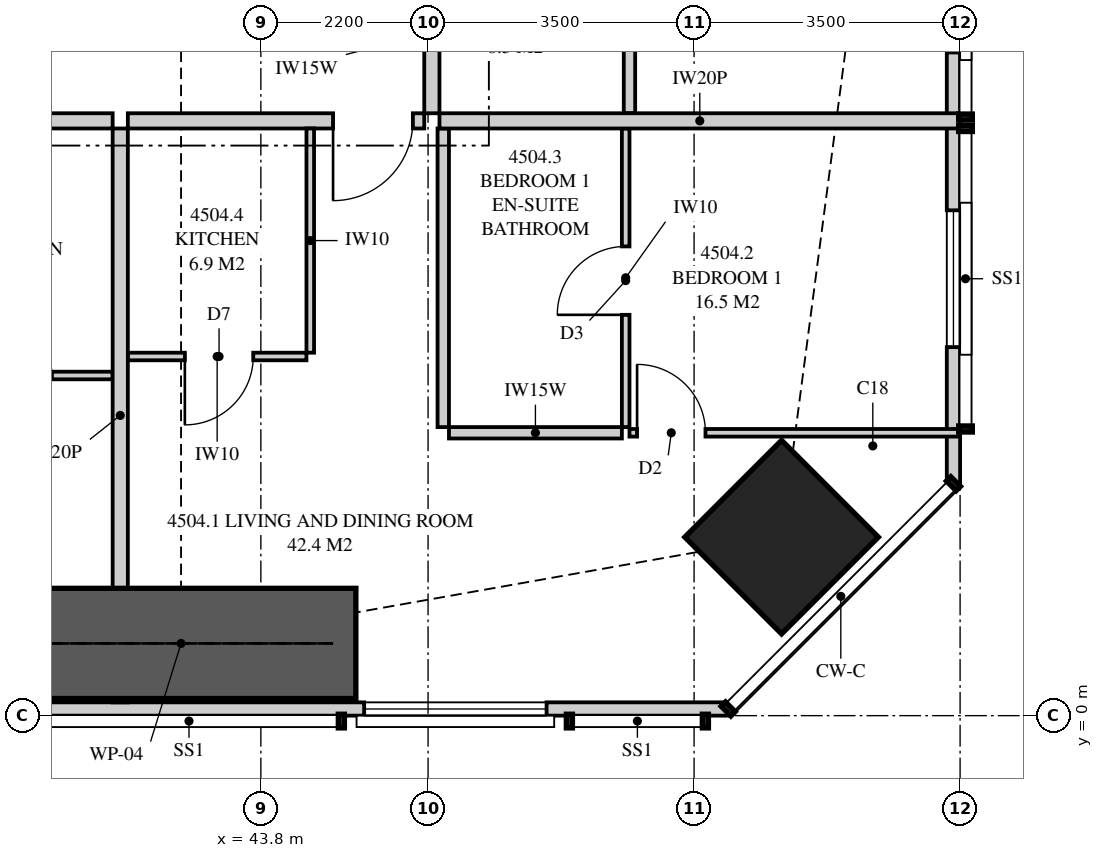
"""IFC4 building model, lengths in metres.
Left out: names, types, materials, properties, quantities, classifications, styles, units other than length and angle.
Written with IfcOpenShell. Run it as: python <this file> out.ifc"""

import sys

from ifc_helpers import new_model, si_unit, direction, frame, frame_2d, origin, origin_2d, place, context, subcontext, project, spatial, polyline, rectangle, outline, extrude, element, fill, save


model = new_model("IFC4")
c1 = context("Model", 3, precision=1e-05, world=origin(), true_north=direction((0.0, 1.0)))
c2 = subcontext(c1, "Body", "Model", "MODEL_VIEW")
j1 = project(units=[si_unit("LENGTHUNIT", "METRE"), si_unit("PLANEANGLEUNIT", "RADIAN")], contexts=[c1])
p1 = place(None, origin())
s1 = spatial("IfcSite", under=j1, at=p1, CompositionType="ELEMENT")
p2 = place(p1, origin())
s2 = spatial("IfcBuilding", under=s1, at=p2, CompositionType="ELEMENT")
p3 = place(p2, frame((0.0, 0.0, 167.75)))
s3 = spatial("IfcBuildingStorey", under=s2, at=p3, CompositionType="ELEMENT", Elevation=167.75)
p4 = place(p3, frame((50.652, 2.348, 0.0), z_axis=(0.0, 0.0, 1.0), x_axis=(0.707106781187, 0.707106781187, 0.0)))
e1 = element("IfcColumn", 1, at=p4, inside=s3, PredefinedType="COLUMN", context=c2, shape_type="SweptSolid", body=[
    extrude(rectangle(XDim=1.8, YDim=1.8, at=origin_2d()), origin(), (0.0, 0.0, 1.0), 3.35),
])
p5 = place(p3, frame((15.051, 0.087, 0.0), z_axis=(0.0, 0.0, 1.0), x_axis=(1.0, 0.0, 0.0)))
e2 = element("IfcWall", 2, at=p5, inside=s3, PredefinedType="SOLIDWALL", context=c2, shape_type="SweptSolid", body=[
    extrude(outline(polyline([(0.0, 0.0), (34.897, 0.0), (34.897, 3.11), (27.91, 3.11), (27.91, 2.15), (27.836, 2.15), (27.836, 3.11), (27.699, 3.11), (27.699, 2.15), (7.199, 2.15), (7.199, 3.11), (7.062, 3.11), (7.062, 2.15), (6.987, 2.15), (6.987, 3.11), (0.0, 3.11), (0.0, 0.0)])), frame((0.0, 0.087, 0.0), z_axis=(0.0, -1.0, 0.0), x_axis=(1.0, 0.0, 0.0)), (0.0, 0.0, 1.0), 0.175),
])
p6 = place(p5, frame((1.824, 0.0, 0.4)))
e3 = element("IfcOpeningElement", 3, at=p6, cuts=e2, PredefinedType="OPENING", context=c2, shape_type="SweptSolid", body=[
    extrude(rectangle(XDim=2.4, YDim=1.7, at=frame_2d((1.2, 0.85))), frame((0.0, 0.097, 0.0), z_axis=(0.0, -1.0, 0.0), x_axis=(1.0, 0.0, 0.0)), (0.0, 0.0, 1.0), 0.195),
])
p7 = place(p5, frame((10.399, 0.0, 0.0)))
e4 = element("IfcOpeningElement", 4, at=p7, cuts=e2, PredefinedType="OPENING", context=c2, shape_type="SweptSolid", body=[
    extrude(rectangle(XDim=1.8, YDim=2.1, at=frame_2d((0.9, 1.05))), frame((0.0, 0.097, 0.0), z_axis=(0.0, -1.0, 0.0), x_axis=(1.0, 0.0, 0.0)), (0.0, 0.0, 1.0), 0.195),
])
p8 = place(p5, frame((13.827, 0.0, 0.4)))
e5 = element("IfcOpeningElement", 5, at=p8, cuts=e2, PredefinedType="OPENING", context=c2, shape_type="SweptSolid", body=[
    extrude(rectangle(XDim=1.2, YDim=1.7, at=frame_2d((0.6, 0.85))), frame((0.0, 0.097, 0.0), z_axis=(0.0, -1.0, 0.0), x_axis=(1.0, 0.0, 0.0)), (0.0, 0.0, 1.0), 0.195),
])
p9 = place(p5, frame((22.799, 0.0, 0.0)))
e6 = element("IfcOpeningElement", 6, at=p9, cuts=e2, PredefinedType="OPENING", context=c2, shape_type="SweptSolid", body=[
    extrude(rectangle(XDim=1.8, YDim=2.1, at=frame_2d((0.9, 1.05))), frame((0.0, 0.097, 0.0), z_axis=(0.0, -1.0, 0.0), x_axis=(1.0, 0.0, 0.0)), (0.0, 0.0, 1.0), 0.195),
])
p10 = place(p5, frame((19.849, 0.0, 0.4)))
e7 = element("IfcOpeningElement", 7, at=p10, cuts=e2, PredefinedType="OPENING", context=c2, shape_type="SweptSolid", body=[
    extrude(rectangle(XDim=2.4, YDim=1.7, at=frame_2d((1.2, 0.85))), frame((0.0, 0.097, 0.0), z_axis=(0.0, -1.0, 0.0), x_axis=(1.0, 0.0, 0.0)), (0.0, 0.0, 1.0), 0.195),
])
p11 = place(p5, frame((30.108, 0.0, 0.4)))
e8 = element("IfcOpeningElement", 8, at=p11, cuts=e2, PredefinedType="OPENING", context=c2, shape_type="SweptSolid", body=[
    extrude(rectangle(XDim=2.4, YDim=1.7, at=frame_2d((1.2, 0.85))), frame((0.0, 0.097, 0.0), z_axis=(0.0, -1.0, 0.0), x_axis=(1.0, 0.0, 0.0)), (0.0, 0.0, 1.0), 0.195),
])
p12 = place(p3, frame((52.913, 3.051, 0.0), z_axis=(0.0, 0.0, 1.0), x_axis=(0.0, 1.0, 0.0)))
e9 = element("IfcWall", 9, at=p12, inside=s3, PredefinedType="SOLIDWALL", context=c2, shape_type="SweptSolid", body=[
    extrude(outline(polyline([(0.0, 0.0), (29.897, 0.0), (29.897, 3.11), (22.167, 3.11), (22.167, 2.15), (22.074, 2.15), (22.074, 3.11), (21.949, 3.11), (21.949, 2.15), (9.949, 2.15), (9.949, 3.11), (9.847, 3.11), (9.847, 2.15), (9.706, 2.15), (9.706, 3.11), (0.0, 3.11), (0.0, 0.0)])), frame((0.0, 0.087, 0.0), z_axis=(0.0, -1.0, 0.0), x_axis=(1.0, 0.0, 0.0)), (0.0, 0.0, 1.0), 0.175),
])
p13 = place(p12, frame((1.797, 0.0, 0.4)))
e10 = element("IfcOpeningElement", 10, at=p13, cuts=e9, PredefinedType="OPENING", context=c2, shape_type="SweptSolid", body=[
    extrude(rectangle(XDim=1.8, YDim=1.7, at=frame_2d((0.9, 0.85))), frame((0.0, 0.097, 0.0), z_axis=(0.0, -1.0, 0.0), x_axis=(1.0, 0.0, 0.0)), (0.0, 0.0, 1.0), 0.195),
])
p14 = place(p12, frame((5.674, 0.0, 0.4)))
e11 = element("IfcOpeningElement", 11, at=p14, cuts=e9, PredefinedType="OPENING", context=c2, shape_type="SweptSolid", body=[
    extrude(rectangle(XDim=1.8, YDim=1.7, at=frame_2d((0.9, 0.85))), frame((0.0, 0.097, 0.0), z_axis=(0.0, -1.0, 0.0), x_axis=(1.0, 0.0, 0.0)), (0.0, 0.0, 1.0), 0.195),
])
p15 = place(p12, frame((12.349, 0.0, 0.4)))
e12 = element("IfcOpeningElement", 12, at=p15, cuts=e9, PredefinedType="OPENING", context=c2, shape_type="SweptSolid", body=[
    extrude(rectangle(XDim=2.4, YDim=1.7, at=frame_2d((1.2, 0.85))), frame((0.0, 0.097, 0.0), z_axis=(0.0, -1.0, 0.0), x_axis=(1.0, 0.0, 0.0)), (0.0, 0.0, 1.0), 0.195),
])
p16 = place(p12, frame((15.274, 0.0, 0.0)))
e13 = element("IfcOpeningElement", 13, at=p16, cuts=e9, PredefinedType="OPENING", context=c2, shape_type="SweptSolid", body=[
    extrude(rectangle(XDim=1.8, YDim=2.1, at=frame_2d((0.9, 1.05))), frame((0.0, 0.097, 0.0), z_axis=(0.0, -1.0, 0.0), x_axis=(1.0, 0.0, 0.0)), (0.0, 0.0, 1.0), 0.195),
])
p17 = place(p12, frame((24.373, 0.0, 0.4)))
e14 = element("IfcOpeningElement", 14, at=p17, cuts=e9, PredefinedType="OPENING", context=c2, shape_type="SweptSolid", body=[
    extrude(rectangle(XDim=1.2, YDim=1.7, at=frame_2d((0.6, 0.85))), frame((0.0, 0.097, 0.0), z_axis=(0.0, -1.0, 0.0), x_axis=(1.0, 0.0, 0.0)), (0.0, 0.0, 1.0), 0.195),
])
p18 = place(p12, frame((26.801, 0.0, 0.4)))
e15 = element("IfcOpeningElement", 15, at=p18, cuts=e9, PredefinedType="OPENING", context=c2, shape_type="SweptSolid", body=[
    extrude(rectangle(XDim=1.8, YDim=1.7, at=frame_2d((0.9, 0.85))), frame((0.0, 0.097, 0.0), z_axis=(0.0, -1.0, 0.0), x_axis=(1.0, 0.0, 0.0)), (0.0, 0.0, 1.0), 0.195),
])
p19 = place(p3, frame((41.95, 0.175, 0.0), z_axis=(0.0, 0.0, 1.0), x_axis=(0.0, 1.0, 0.0)))
e16 = element("IfcWall", 16, at=p19, inside=s3, PredefinedType="PARTITIONING", context=c2, shape_type="SweptSolid", body=[
    extrude(outline(polyline([(0.529, 2.15), (0.0, 2.15), (0.0, 0.0), (0.529, 0.0), (0.529, 0.876), (1.021, 0.876), (1.021, 0.0), (7.55, 0.0), (7.55, 3.11), (1.685, 3.11), (1.685, 2.15), (1.021, 2.15), (1.021, 1.274), (0.529, 1.274), (0.529, 2.15)])), frame((0.0, 0.1, 0.0), z_axis=(0.0, -1.0, 0.0), x_axis=(1.0, 0.0, 0.0)), (0.0, 0.0, 1.0), 0.2),
])
p20 = place(p3, frame((42.05, 7.825, 0.0), z_axis=(0.0, 0.0, 1.0), x_axis=(1.0, 0.0, 0.0)))
e17 = element("IfcWall", 17, at=p20, inside=s3, PredefinedType="PARTITIONING", context=c2, shape_type="SweptSolid", body=[
    extrude(outline(polyline([(0.0, 0.0), (3.9, 0.0), (3.9, 3.11), (1.037, 3.11), (1.037, 2.541), (0.363, 2.541), (0.363, 3.11), (0.0, 3.11), (0.0, 0.0)])), frame((0.0, 0.1, 0.0), z_axis=(0.0, -1.0, 0.0), x_axis=(1.0, 0.0, 0.0)), (0.0, 0.0, 1.0), 0.2),
])
p21 = place(p20, frame((2.7, 0.0, 0.0)))
e18 = element("IfcOpeningElement", 18, at=p21, cuts=e17, PredefinedType="OPENING", context=c2, shape_type="SweptSolid", body=[
    extrude(rectangle(XDim=1.05, YDim=2.2, at=frame_2d((0.525, 1.1))), frame((0.0, 0.11, 0.0), z_axis=(0.0, -1.0, 0.0), x_axis=(1.0, 0.0, 0.0)), (0.0, 0.0, 1.0), 0.22),
])
p22 = place(p3, frame((48.6, 3.796, 0.0), z_axis=(0.0, 0.0, 1.0), x_axis=(0.0, 1.0, 0.0)))
e19 = element("IfcWall", 19, at=p22, inside=s3, PredefinedType="PARTITIONING", context=c2, shape_type="SweptSolid", body=[
    extrude(rectangle(XDim=3.929, YDim=0.1, at=frame_2d((1.964, 0.0))), origin(), (0.0, 0.0, 1.0), 3.11),
])
p23 = place(p22, frame((1.477, 0.0, 0.0)))
e20 = element("IfcOpeningElement", 20, at=p23, cuts=e19, PredefinedType="OPENING", context=c2, shape_type="SweptSolid", body=[
    extrude(rectangle(XDim=0.9, YDim=2.1, at=frame_2d((0.45, 1.05))), frame((0.0, 0.06, 0.0), z_axis=(0.0, -1.0, 0.0), x_axis=(1.0, 0.0, 0.0)), (0.0, 0.0, 1.0), 0.12),
])
p24 = place(p3, frame((48.65, 3.721, 0.0), z_axis=(0.0, 0.0, 1.0), x_axis=(1.0, 0.0, 0.0)))
e21 = element("IfcWall", 21, at=p24, inside=s3, PredefinedType="PARTITIONING", context=c2, shape_type="SweptSolid", body=[
    extrude(outline(polyline([(0.0, 0.0), (4.35, 0.0), (4.35, 3.11), (3.049, 3.11), (3.049, 2.15), (1.314, 2.15), (1.314, 3.11), (0.0, 3.11), (0.0, 0.0)])), frame((0.0, 0.05, 0.0), z_axis=(0.0, -1.0, 0.0), x_axis=(1.0, 0.0, 0.0)), (0.0, 0.0, 1.0), 0.1),
])
p25 = place(p24, frame((0.1, 0.0, 0.0)))
e22 = element("IfcOpeningElement", 22, at=p25, cuts=e21, PredefinedType="OPENING", context=c2, shape_type="SweptSolid", body=[
    extrude(rectangle(XDim=0.9, YDim=2.1, at=frame_2d((0.45, 1.05))), frame((0.0, 0.06, 0.0), z_axis=(0.0, -1.0, 0.0), x_axis=(1.0, 0.0, 0.0)), (0.0, 0.0, 1.0), 0.12),
])
p26 = place(p3, frame((46.275, 3.721, 0.0), z_axis=(0.0, 0.0, 1.0), x_axis=(1.0, 0.0, 0.0)))
e23 = element("IfcWall", 23, at=p26, inside=s3, PredefinedType="PLUMBINGWALL", context=c2, shape_type="SweptSolid", body=[
    extrude(rectangle(XDim=2.275, YDim=0.15, at=frame_2d((1.138, 0.0))), origin(), (0.0, 0.0, 1.0), 3.11),
])
p27 = place(p3, frame((46.2, 3.796, 0.0), z_axis=(0.0, 0.0, 1.0), x_axis=(0.0, 1.0, 0.0)))
e24 = element("IfcWall", 24, at=p27, inside=s3, PredefinedType="PLUMBINGWALL", context=c2, shape_type="SweptSolid", body=[
    extrude(rectangle(XDim=3.929, YDim=0.15, at=frame_2d((1.964, 0.0))), origin(), (0.0, 0.0, 1.0), 3.11),
])
p28 = place(p3, frame((42.05, 4.725, 0.0), z_axis=(0.0, 0.0, 1.0), x_axis=(1.0, 0.0, 0.0)))
e25 = element("IfcWall", 25, at=p28, inside=s3, PredefinedType="PARTITIONING", context=c2, shape_type="SweptSolid", body=[
    extrude(outline(polyline([(0.0, 0.0), (2.35, 0.0), (2.35, 3.11), (0.987, 3.11), (0.987, 2.541), (0.413, 2.541), (0.413, 3.11), (0.0, 3.11), (0.0, 0.0)])), frame((0.0, 0.05, 0.0), z_axis=(0.0, -1.0, 0.0), x_axis=(1.0, 0.0, 0.0)), (0.0, 0.0, 1.0), 0.1),
])
p29 = place(p28, frame((0.75, 0.0, 0.0)))
e26 = element("IfcOpeningElement", 26, at=p29, cuts=e25, PredefinedType="OPENING", context=c2, shape_type="SweptSolid", body=[
    extrude(rectangle(XDim=0.9, YDim=2.1, at=frame_2d((0.45, 1.05))), frame((0.0, 0.06, 0.0), z_axis=(0.0, -1.0, 0.0), x_axis=(1.0, 0.0, 0.0)), (0.0, 0.0, 1.0), 0.12),
])
p30 = place(p3, frame((44.45, 4.775, 0.0), z_axis=(0.0, 0.0, 1.0), x_axis=(0.0, 1.0, 0.0)))
e27 = element("IfcWall", 27, at=p30, inside=s3, PredefinedType="PARTITIONING", context=c2, shape_type="SweptSolid", body=[
    extrude(rectangle(XDim=2.95, YDim=0.1, at=frame_2d((1.475, 0.0))), origin(), (0.0, 0.0, 1.0), 3.11),
])
p31 = place(p3, frame((46.15, 7.825, 0.0), z_axis=(0.0, 0.0, 1.0), x_axis=(1.0, 0.0, 0.0)))
e28 = element("IfcWall", 28, at=p31, inside=s3, PredefinedType="PARTITIONING", context=c2, shape_type="SweptSolid", body=[
    extrude(outline(polyline([(0.0, 0.0), (6.85, 0.0), (6.85, 3.11), (6.138, 3.11), (6.138, 2.15), (4.303, 2.15), (4.303, 3.11), (0.0, 3.11), (0.0, 0.0)])), frame((0.0, 0.1, 0.0), z_axis=(0.0, -1.0, 0.0), x_axis=(1.0, 0.0, 0.0)), (0.0, 0.0, 1.0), 0.2),
])
p32 = place(p3, frame((46.05, 7.925, 0.0), z_axis=(0.0, 0.0, 1.0), x_axis=(0.0, 1.0, 0.0)))
e29 = element("IfcWall", 29, at=p32, inside=s3, PredefinedType="PARTITIONING", context=c2, shape_type="SweptSolid", body=[
    extrude(outline(polyline([(0.0, 0.0), (6.012, 0.0), (6.012, 3.11), (5.412, 3.11), (5.412, 2.541), (4.738, 2.541), (4.738, 3.11), (0.0, 3.11), (0.0, 0.0)])), frame((0.0, 0.1, 0.0), z_axis=(0.0, -1.0, 0.0), x_axis=(1.0, 0.0, 0.0)), (0.0, 0.0, 1.0), 0.2),
])
p33 = place(p3, frame((48.65, 7.925, 0.0), z_axis=(0.0, 0.0, 1.0), x_axis=(0.0, 1.0, 0.0)))
e30 = element("IfcWall", 30, at=p33, inside=s3, PredefinedType="PLUMBINGWALL", context=c2, shape_type="SweptSolid", body=[
    extrude(rectangle(XDim=3.45, YDim=0.15, at=frame_2d((1.725, 0.0))), origin(), (0.0, 0.0, 1.0), 3.11),
])
p34 = place(p33, frame((2.15, 0.0, 0.0)))
e31 = element("IfcOpeningElement", 31, at=p34, cuts=e30, PredefinedType="OPENING", context=c2, shape_type="SweptSolid", body=[
    extrude(rectangle(XDim=0.9, YDim=2.1, at=frame_2d((0.45, 1.05))), frame((0.0, 0.085, 0.0), z_axis=(0.0, -1.0, 0.0), x_axis=(1.0, 0.0, 0.0)), (0.0, 0.0, 1.0), 0.17),
])
p35 = place(p3, frame((39.175, 7.825, 0.0), z_axis=(0.0, 0.0, 1.0), x_axis=(1.0, 0.0, 0.0)))
e32 = element("IfcWall", 32, at=p35, inside=s3, PredefinedType="PARTITIONING", context=c2, shape_type="SweptSolid", body=[
    extrude(rectangle(XDim=2.675, YDim=0.2, at=frame_2d((1.337, 0.0))), origin(), (0.0, 0.0, 1.0), 3.11),
])
p36 = place(p3, frame((41.85, 4.475, 0.0), z_axis=(0.0, 0.0, 1.0), x_axis=(-1.0, 0.0, 0.0)))
e33 = element("IfcWall", 33, at=p36, inside=s3, PredefinedType="PARTITIONING", context=c2, shape_type="SweptSolid", body=[
    extrude(rectangle(XDim=2.5, YDim=0.1, at=frame_2d((1.25, 0.0))), origin(), (0.0, 0.0, 1.0), 3.11),
])
p37 = place(p36, frame((0.8, 0.0, 0.0)))
e34 = element("IfcOpeningElement", 34, at=p37, cuts=e33, PredefinedType="OPENING", context=c2, shape_type="SweptSolid", body=[
    extrude(rectangle(XDim=0.9, YDim=2.1, at=frame_2d((0.45, 1.05))), frame((0.0, 0.06, 0.0), z_axis=(0.0, -1.0, 0.0), x_axis=(1.0, 0.0, 0.0)), (0.0, 0.0, 1.0), 0.12),
])
p38 = place(p3, frame((40.45, 0.95, 0.0), z_axis=(0.0, 0.0, 1.0), x_axis=(1.0, 0.0, 0.0)))
e35 = element("IfcWall", 35, at=p38, inside=s3, PredefinedType="SHEAR", context=c2, shape_type="SweptSolid", body=[
    extrude(rectangle(XDim=4.6, YDim=1.45, at=frame_2d((2.3, 0.0))), origin(), (0.0, 0.0, 1.0), 3.35),
])
p39 = place(p11, origin())
e36 = element("IfcWindow", 36, at=p39, inside=s3, PartitioningType="SINGLE_PANEL", PredefinedType="WINDOW", context=c2, shape_type="SweptSolid", body=[
    extrude(rectangle(XDim=2.4, YDim=1.7, at=frame_2d((1.2, 0.85))), frame((0.0, 0.03, 0.0), z_axis=(0.0, -1.0, 0.0), x_axis=(1.0, 0.0, 0.0)), (0.0, 0.0, 1.0), 0.06),
])
fill(e8, e36)
p40 = place(p13, origin())
e37 = element("IfcWindow", 37, at=p40, inside=s3, PartitioningType="SINGLE_PANEL", PredefinedType="WINDOW", context=c2, shape_type="SweptSolid", body=[
    extrude(rectangle(XDim=1.8, YDim=1.7, at=frame_2d((0.9, 0.85))), frame((0.0, 0.03, 0.0), z_axis=(0.0, -1.0, 0.0), x_axis=(1.0, 0.0, 0.0)), (0.0, 0.0, 1.0), 0.06),
])
fill(e10, e37)
p41 = place(p14, origin())
e38 = element("IfcWindow", 38, at=p41, inside=s3, PartitioningType="SINGLE_PANEL", PredefinedType="WINDOW", context=c2, shape_type="SweptSolid", body=[
    extrude(rectangle(XDim=1.8, YDim=1.7, at=frame_2d((0.9, 0.85))), frame((0.0, 0.03, 0.0), z_axis=(0.0, -1.0, 0.0), x_axis=(1.0, 0.0, 0.0)), (0.0, 0.0, 1.0), 0.06),
])
fill(e11, e38)
p42 = place(p21, frame((1.05, 0.0, 0.0), z_axis=(0.0, 0.0, 1.0), x_axis=(-1.0, 0.0, 0.0)))
e39 = element("IfcDoor", 39, at=p42, inside=s3, OperationType="SINGLE_SWING_RIGHT", PredefinedType="DOOR", context=c2, shape_type="SweptSolid", body=[
    extrude(rectangle(XDim=1.05, YDim=2.2, at=frame_2d((0.525, 1.1))), frame((0.0, 0.025, 0.0), z_axis=(0.0, -1.0, 0.0), x_axis=(1.0, 0.0, 0.0)), (0.0, 0.0, 1.0), 0.05),
])
fill(e18, e39)
p43 = place(p25, origin())
e40 = element("IfcDoor", 40, at=p43, inside=s3, OperationType="SINGLE_SWING_LEFT", PredefinedType="DOOR", context=c2, shape_type="SweptSolid", body=[
    extrude(rectangle(XDim=0.9, YDim=2.1, at=frame_2d((0.45, 1.05))), frame((0.0, 0.025, 0.0), z_axis=(0.0, -1.0, 0.0), x_axis=(1.0, 0.0, 0.0)), (0.0, 0.0, 1.0), 0.05),
])
fill(e22, e40)
p44 = place(p23, origin())
e41 = element("IfcDoor", 41, at=p44, inside=s3, OperationType="SINGLE_SWING_LEFT", PredefinedType="DOOR", context=c2, shape_type="SweptSolid", body=[
    extrude(rectangle(XDim=0.9, YDim=2.1, at=frame_2d((0.45, 1.05))), frame((0.0, 0.025, 0.0), z_axis=(0.0, -1.0, 0.0), x_axis=(1.0, 0.0, 0.0)), (0.0, 0.0, 1.0), 0.05),
])
fill(e20, e41)
p45 = place(p29, frame((0.9, 0.0, 0.0), z_axis=(0.0, 0.0, 1.0), x_axis=(-1.0, 0.0, 0.0)))
e42 = element("IfcDoor", 42, at=p45, inside=s3, OperationType="SINGLE_SWING_RIGHT", PredefinedType="DOOR", context=c2, shape_type="SweptSolid", body=[
    extrude(rectangle(XDim=0.9, YDim=2.1, at=frame_2d((0.45, 1.05))), frame((0.0, 0.025, 0.0), z_axis=(0.0, -1.0, 0.0), x_axis=(1.0, 0.0, 0.0)), (0.0, 0.0, 1.0), 0.05),
])
fill(e26, e42)
save(model, sys.argv[1])
